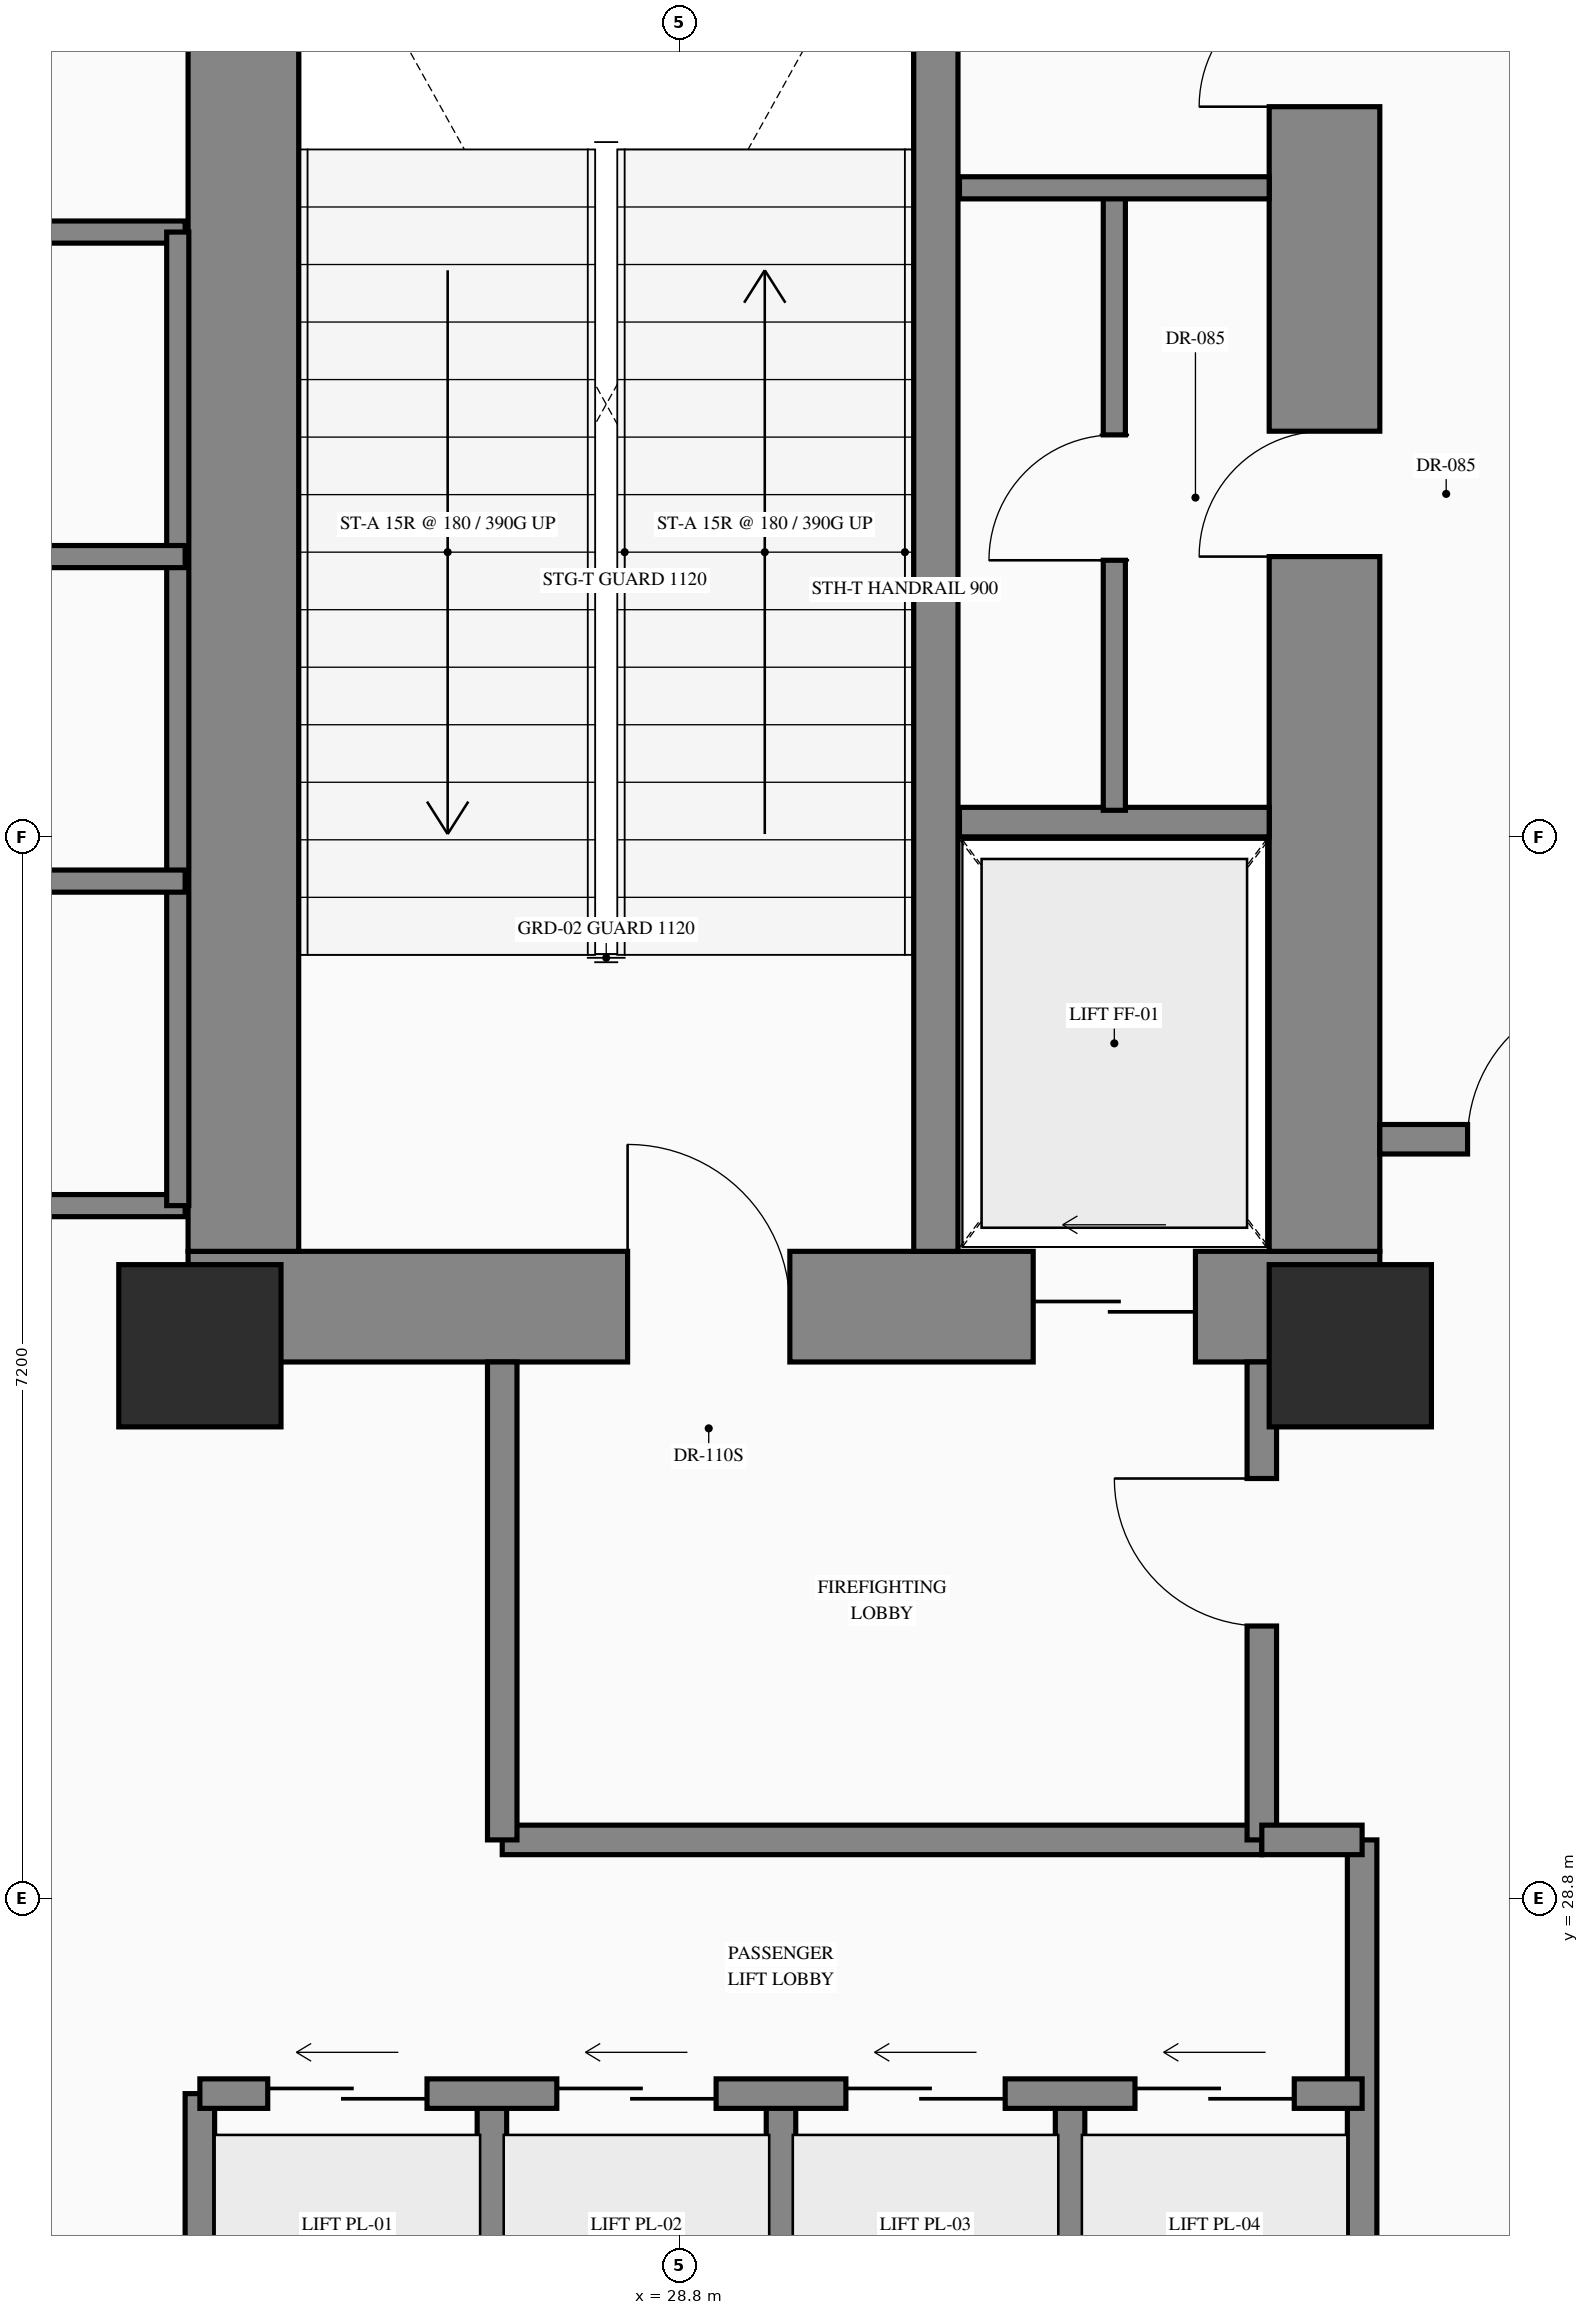
"""IFC4 building model, lengths in metres.
Left out: names, types, materials, properties, quantities, classifications, styles, units other than length and angle.
Written with IfcOpenShell. Run it as: python <this file> out.ifc"""

import sys

from ifc_helpers import new_model, si_unit, direction, frame, frame_2d, origin, origin_2d, place, context, subcontext, project, spatial, rectangle, extrude, element, fill, save


model = new_model("IFC4")
c1 = context("Model", 3, precision=1e-05, world=origin(), true_north=direction((0.0, 1.0)))
c2 = subcontext(c1, "Body", "Model", "MODEL_VIEW")
j1 = project(units=[si_unit("LENGTHUNIT", "METRE"), si_unit("PLANEANGLEUNIT", "RADIAN")], contexts=[c1])
p1 = place(None, origin())
s1 = spatial("IfcSite", under=j1, at=p1, CompositionType="ELEMENT")
p2 = place(p1, origin())
s2 = spatial("IfcBuilding", under=s1, at=p2, CompositionType="ELEMENT")
p3 = place(p2, origin())
s3 = spatial("IfcBuildingStorey", under=s2, at=p3, CompositionType="ELEMENT", Elevation=0.0)
p4 = place(p3, frame((25.47, 32.815, 0.0), z_axis=(0.0, 0.0, 1.0), x_axis=(1.0, 0.0, 0.0)))
e1 = element("IfcWall", 1, at=p4, inside=s3, PredefinedType="SHEAR", context=c2, shape_type="SweptSolid", body=[
    extrude(rectangle(XDim=8.08, YDim=0.75, at=frame_2d((4.04, 0.0))), origin(), (0.0, 0.0, 1.0), 5.4),
])
p5 = place(p4, frame((2.98, 0.0, 0.0)))
e2 = element("IfcOpeningElement", 2, at=p5, cuts=e1, PredefinedType="OPENING", context=c2, shape_type="SweptSolid", body=[
    extrude(rectangle(XDim=1.1, YDim=2.2, at=frame_2d((0.55, 1.1))), frame((0.0, 0.385, 0.0), z_axis=(0.0, -1.0, 0.0), x_axis=(1.0, 0.0, 0.0)), (0.0, 0.0, 1.0), 0.77),
])
p6 = place(p4, frame((5.73, 0.0, 0.0)))
e3 = element("IfcOpeningElement", 3, at=p6, cuts=e1, PredefinedType="OPENING", context=c2, shape_type="SweptSolid", body=[
    extrude(rectangle(XDim=1.1, YDim=2.15, at=frame_2d((0.55, 1.075))), frame((0.0, 0.385, 0.0), z_axis=(0.0, -1.0, 0.0), x_axis=(1.0, 0.0, 0.0)), (0.0, 0.0, 1.0), 0.77),
])
p7 = place(p3, frame((25.845, 33.19, 0.0), z_axis=(0.0, 0.0, 1.0), x_axis=(0.0, 1.0, 0.0)))
e4 = element("IfcWall", 4, at=p7, inside=s3, PredefinedType="SHEAR", context=c2, shape_type="SweptSolid", body=[
    extrude(rectangle(XDim=9.48, YDim=0.75, at=frame_2d((4.74, 0.0))), origin(), (0.0, 0.0, 1.0), 5.4),
])
p8 = place(p3, frame((33.175, 33.19, 0.0), z_axis=(0.0, 0.0, 1.0), x_axis=(0.0, 1.0, 0.0)))
e5 = element("IfcWall", 5, at=p8, inside=s3, PredefinedType="SHEAR", context=c2, shape_type="SweptSolid", body=[
    extrude(rectangle(XDim=9.48, YDim=0.75, at=frame_2d((4.74, 0.0))), origin(), (0.0, 0.0, 1.0), 5.4),
])
p9 = place(p8, frame((4.71, 0.0, 0.0)))
e6 = element("IfcOpeningElement", 6, at=p9, cuts=e5, PredefinedType="OPENING", context=c2, shape_type="SweptSolid", body=[
    extrude(rectangle(XDim=0.85, YDim=2.08, at=frame_2d((0.425, 1.04))), frame((0.0, 0.385, 0.0), z_axis=(0.0, -1.0, 0.0), x_axis=(1.0, 0.0, 0.0)), (0.0, 0.0, 1.0), 0.77),
])
p10 = place(p8, frame((7.76, 0.0, 0.0)))
e7 = element("IfcOpeningElement", 7, at=p10, cuts=e5, PredefinedType="OPENING", context=c2, shape_type="SweptSolid", body=[
    extrude(rectangle(XDim=0.85, YDim=2.08, at=frame_2d((0.425, 1.04))), frame((0.0, 0.385, 0.0), z_axis=(0.0, -1.0, 0.0), x_axis=(1.0, 0.0, 0.0)), (0.0, 0.0, 1.0), 0.77),
])
p11 = place(p3, frame((30.54, 33.19, 0.0), z_axis=(0.0, 0.0, 1.0), x_axis=(0.0, 1.0, 0.0)))
e8 = element("IfcWall", 8, at=p11, inside=s3, PredefinedType="SHEAR", context=c2, shape_type="SweptSolid", body=[
    extrude(rectangle(XDim=9.48, YDim=0.3, at=frame_2d((4.74, 0.0))), origin(), (0.0, 0.0, 1.0), 5.4),
])
for number, where, z_axis, x_axis in (
    (9, (25.55, 32.55, 0.0), (0.0, 0.0, 1.0), (1.0, 0.0, 0.0)),
    (10, (33.35, 32.55, 0.0), (0.0, 0.0, 1.0), (1.0, 0.0, 0.0)),
):
    element("IfcColumn", number, at=place(p3, frame(where, z_axis=z_axis, x_axis=x_axis)), inside=s3, PredefinedType="COLUMN", context=c2, shape_type="SweptSolid", body=[
        extrude(rectangle(XDim=1.1, YDim=1.1, at=origin_2d()), origin(), (0.0, 0.0, 1.0), 5.4),
    ])
p12 = place(p3, frame((30.7, 36.1, 0.0), z_axis=(0.0, 0.0, 1.0), x_axis=(1.0, 0.0, 0.0)))
e11 = element("IfcWall", 11, at=p12, inside=s3, PredefinedType="STANDARD", context=c2, shape_type="SweptSolid", body=[
    extrude(rectangle(XDim=2.1, YDim=0.2, at=frame_2d((1.05, 0.0))), origin(), (0.0, 0.0, 1.0), 5.1),
])
p13 = place(p3, frame((31.75, 36.18, 0.0), z_axis=(0.0, 0.0, 1.0), x_axis=(0.0, 1.0, 0.0)))
e12 = element("IfcWall", 12, at=p13, inside=s3, PredefinedType="PARTITIONING", context=c2, shape_type="SweptSolid", body=[
    extrude(rectangle(XDim=4.24, YDim=0.15, at=frame_2d((2.12, 0.0))), origin(), (0.0, 0.0, 1.0), 5.1),
])
p14 = place(p13, frame((1.695, 0.0, 0.0)))
e13 = element("IfcOpeningElement", 13, at=p14, cuts=e12, PredefinedType="OPENING", context=c2, shape_type="SweptSolid", body=[
    extrude(rectangle(XDim=0.85, YDim=2.08, at=frame_2d((0.425, 1.04))), frame((0.0, 0.085, 0.0), z_axis=(0.0, -1.0, 0.0), x_axis=(1.0, 0.0, 0.0)), (0.0, 0.0, 1.0), 0.17),
])
p15 = place(p3, frame((30.7, 40.4, 0.0), z_axis=(0.0, 0.0, 1.0), x_axis=(1.0, 0.0, 0.0)))
e14 = element("IfcWall", 14, at=p15, inside=s3, PredefinedType="PARTITIONING", context=c2, shape_type="SweptSolid", body=[
    extrude(rectangle(XDim=2.1, YDim=0.15, at=frame_2d((1.05, 0.0))), origin(), (0.0, 0.0, 1.0), 5.1),
])
p16 = place(p3, frame((27.6, 29.2, 0.0), z_axis=(0.0, 0.0, 1.0), x_axis=(1.0, 0.0, 0.0)))
e15 = element("IfcWall", 15, at=p16, inside=s3, PredefinedType="STANDARD", context=c2, shape_type="SweptSolid", body=[
    extrude(rectangle(XDim=5.15, YDim=0.2, at=frame_2d((2.575, 0.0))), origin(), (0.0, 0.0, 1.0), 5.1),
])
p17 = place(p3, frame((27.6, 29.2, 0.0), z_axis=(0.0, 0.0, 1.0), x_axis=(0.0, 1.0, 0.0)))
e16 = element("IfcWall", 16, at=p17, inside=s3, PredefinedType="STANDARD", context=c2, shape_type="SweptSolid", body=[
    extrude(rectangle(XDim=3.24, YDim=0.2, at=frame_2d((1.62, 0.0))), origin(), (0.0, 0.0, 1.0), 5.1),
])
p18 = place(p3, frame((32.75, 29.2, 0.0), z_axis=(0.0, 0.0, 1.0), x_axis=(0.0, 1.0, 0.0)))
e17 = element("IfcWall", 17, at=p18, inside=s3, PredefinedType="STANDARD", context=c2, shape_type="SweptSolid", body=[
    extrude(rectangle(XDim=3.24, YDim=0.2, at=frame_2d((1.62, 0.0))), origin(), (0.0, 0.0, 1.0), 5.1),
])
p19 = place(p18, frame((1.45, 0.0, 0.0)))
e18 = element("IfcOpeningElement", 18, at=p19, cuts=e17, PredefinedType="OPENING", context=c2, shape_type="SweptSolid", body=[
    extrude(rectangle(XDim=1.0, YDim=2.2, at=frame_2d((0.5, 1.1))), frame((0.0, 0.11, 0.0), z_axis=(0.0, -1.0, 0.0), x_axis=(1.0, 0.0, 0.0)), (0.0, 0.0, 1.0), 0.22),
])
p20 = place(p3, frame((25.55, 23.4, 0.0), z_axis=(0.0, 0.0, 1.0), x_axis=(0.0, 1.0, 0.0)))
e19 = element("IfcWall", 19, at=p20, inside=s3, PredefinedType="STANDARD", context=c2, shape_type="SweptSolid", body=[
    extrude(rectangle(XDim=4.08, YDim=0.2, at=frame_2d((2.04, 0.0))), origin(), (0.0, 0.0, 1.0), 3.895),
])
p21 = place(p3, frame((33.43, 23.4, 0.0), z_axis=(0.0, 0.0, 1.0), x_axis=(0.0, 1.0, 0.0)))
e20 = element("IfcWall", 20, at=p21, inside=s3, PredefinedType="STANDARD", context=c2, shape_type="SweptSolid", body=[
    extrude(rectangle(XDim=5.8, YDim=0.2, at=frame_2d((2.9, 0.0))), origin(), (0.0, 0.0, 1.0), 3.895),
])
for number, where, z_axis, x_axis in (
    (21, (27.53, 25.32, 0.0), (0.0, 0.0, 1.0), (0.0, 1.0, 0.0)),
    (22, (29.49, 25.32, 0.0), (0.0, 0.0, 1.0), (0.0, 1.0, 0.0)),
    (23, (31.45, 25.32, 0.0), (0.0, 0.0, 1.0), (0.0, 1.0, 0.0)),
):
    element("IfcWall", number, at=place(p3, frame(where, z_axis=z_axis, x_axis=x_axis)), inside=s3, PredefinedType="STANDARD", context=c2, shape_type="SweptSolid", body=[
        extrude(rectangle(XDim=2.16, YDim=0.2, at=frame_2d((1.08, 0.0))), origin(), (0.0, 0.0, 1.0), 5.1),
    ])
p22 = place(p3, frame((25.55, 27.48, 0.0), z_axis=(0.0, 0.0, 1.0), x_axis=(1.0, 0.0, 0.0)))
e24 = element("IfcWall", 24, at=p22, inside=s3, PredefinedType="STANDARD", context=c2, shape_type="SweptSolid", body=[
    extrude(rectangle(XDim=7.88, YDim=0.2, at=frame_2d((3.94, 0.0))), origin(), (0.0, 0.0, 1.0), 5.1),
])
p23 = place(p22, frame((0.46, 0.0, 0.0)))
e25 = element("IfcOpeningElement", 25, at=p23, cuts=e24, PredefinedType="OPENING", context=c2, shape_type="SweptSolid", body=[
    extrude(rectangle(XDim=1.08, YDim=2.15, at=frame_2d((0.54, 1.075))), frame((0.0, 0.11, 0.0), z_axis=(0.0, -1.0, 0.0), x_axis=(1.0, 0.0, 0.0)), (0.0, 0.0, 1.0), 0.22),
])
p24 = place(p22, frame((2.42, 0.0, 0.0)))
e26 = element("IfcOpeningElement", 26, at=p24, cuts=e24, PredefinedType="OPENING", context=c2, shape_type="SweptSolid", body=[
    extrude(rectangle(XDim=1.08, YDim=2.15, at=frame_2d((0.54, 1.075))), frame((0.0, 0.11, 0.0), z_axis=(0.0, -1.0, 0.0), x_axis=(1.0, 0.0, 0.0)), (0.0, 0.0, 1.0), 0.22),
])
p25 = place(p22, frame((4.38, 0.0, 0.0)))
e27 = element("IfcOpeningElement", 27, at=p25, cuts=e24, PredefinedType="OPENING", context=c2, shape_type="SweptSolid", body=[
    extrude(rectangle(XDim=1.08, YDim=2.15, at=frame_2d((0.54, 1.075))), frame((0.0, 0.11, 0.0), z_axis=(0.0, -1.0, 0.0), x_axis=(1.0, 0.0, 0.0)), (0.0, 0.0, 1.0), 0.22),
])
p26 = place(p22, frame((6.34, 0.0, 0.0)))
e28 = element("IfcOpeningElement", 28, at=p26, cuts=e24, PredefinedType="OPENING", context=c2, shape_type="SweptSolid", body=[
    extrude(rectangle(XDim=1.08, YDim=2.15, at=frame_2d((0.54, 1.075))), frame((0.0, 0.11, 0.0), z_axis=(0.0, -1.0, 0.0), x_axis=(1.0, 0.0, 0.0)), (0.0, 0.0, 1.0), 0.22),
])
for number, where, z_axis, x_axis in (
    (29, (22.15, 33.5, 0.0), (0.0, 0.0, 1.0), (1.0, 0.0, 0.0)),
    (30, (22.15, 40.1, 0.0), (0.0, 0.0, 1.0), (1.0, 0.0, 0.0)),
):
    element("IfcWall", number, at=place(p3, frame(where, z_axis=z_axis, x_axis=x_axis)), inside=s3, PredefinedType="PARTITIONING", context=c2, shape_type="SweptSolid", body=[
        extrude(rectangle(XDim=3.3, YDim=0.15, at=frame_2d((1.65, 0.0))), origin(), (0.0, 0.0, 1.0), 5.1),
    ])
p27 = place(p3, frame((25.4, 33.5, 0.0), z_axis=(0.0, 0.0, 1.0), x_axis=(0.0, 1.0, 0.0)))
e31 = element("IfcWall", 31, at=p27, inside=s3, PredefinedType="PARTITIONING", context=c2, shape_type="SweptSolid", body=[
    extrude(rectangle(XDim=6.6, YDim=0.15, at=frame_2d((3.3, 0.0))), origin(), (0.0, 0.0, 1.0), 5.1),
])
for number, where, z_axis, x_axis in (
    (32, (22.15, 35.7, 0.0), (0.0, 0.0, 1.0), (1.0, 0.0, 0.0)),
    (33, (22.15, 37.9, 0.0), (0.0, 0.0, 1.0), (1.0, 0.0, 0.0)),
):
    element("IfcWall", number, at=place(p3, frame(where, z_axis=z_axis, x_axis=x_axis)), inside=s3, PredefinedType="PARTITIONING", context=c2, shape_type="SweptSolid", body=[
        extrude(rectangle(XDim=3.3, YDim=0.15, at=frame_2d((1.65, 0.0))), origin(), (0.0, 0.0, 1.0), 5.1),
    ])
p28 = place(p3, frame((33.55, 33.95, 0.0), z_axis=(0.0, 0.0, 1.0), x_axis=(1.0, 0.0, 0.0)))
e34 = element("IfcWall", 34, at=p28, inside=s3, PredefinedType="STANDARD", context=c2, shape_type="SweptSolid", body=[
    extrude(rectangle(XDim=2.19, YDim=0.2, at=frame_2d((1.095, 0.0))), origin(), (0.0, 0.0, 1.0), 5.1),
])
p29 = place(p28, frame((0.595, 0.0, 0.0)))
e35 = element("IfcOpeningElement", 35, at=p29, cuts=e34, PredefinedType="OPENING", context=c2, shape_type="SweptSolid", body=[
    extrude(rectangle(XDim=1.0, YDim=2.2, at=frame_2d((0.5, 1.1))), frame((0.0, 0.11, 0.0), z_axis=(0.0, -1.0, 0.0), x_axis=(1.0, 0.0, 0.0)), (0.0, 0.0, 1.0), 0.22),
])
p30 = place(p3, frame((32.75, 29.2, 0.0), z_axis=(0.0, 0.0, 1.0), x_axis=(1.0, 0.0, 0.0)))
e36 = element("IfcWall", 36, at=p30, inside=s3, PredefinedType="STANDARD", context=c2, shape_type="SweptSolid", body=[
    extrude(rectangle(XDim=0.68, YDim=0.2, at=frame_2d((0.34, 0.0))), origin(), (0.0, 0.0, 1.0), 5.1),
])
p31 = place(p5, origin())
e37 = element("IfcDoor", 37, at=p31, inside=s3, OperationType="SINGLE_SWING_LEFT", PredefinedType="DOOR", context=c2, shape_type="SweptSolid", body=[
    extrude(rectangle(XDim=1.1, YDim=2.2, at=frame_2d((0.55, 1.1))), frame((0.0, 0.025, 0.0), z_axis=(0.0, -1.0, 0.0), x_axis=(1.0, 0.0, 0.0)), (0.0, 0.0, 1.0), 0.05),
])
fill(e2, e37)
p32 = place(p6, origin())
e38 = element("IfcDoor", 38, at=p32, inside=s3, OperationType="SLIDING_TO_LEFT", PredefinedType="USERDEFINED", context=c2, shape_type="SweptSolid", body=[
    extrude(rectangle(XDim=1.1, YDim=2.15, at=frame_2d((0.55, 1.075))), frame((0.0, 0.025, 0.0), z_axis=(0.0, -1.0, 0.0), x_axis=(1.0, 0.0, 0.0)), (0.0, 0.0, 1.0), 0.05),
])
fill(e3, e38)
p33 = place(p9, origin())
e39 = element("IfcDoor", 39, at=p33, inside=s3, OperationType="SINGLE_SWING_LEFT", PredefinedType="DOOR", context=c2, shape_type="SweptSolid", body=[
    extrude(rectangle(XDim=0.85, YDim=2.08, at=frame_2d((0.425, 1.04))), frame((0.0, 0.025, 0.0), z_axis=(0.0, -1.0, 0.0), x_axis=(1.0, 0.0, 0.0)), (0.0, 0.0, 1.0), 0.05),
])
fill(e6, e39)
p34 = place(p10, origin())
e40 = element("IfcDoor", 40, at=p34, inside=s3, OperationType="SINGLE_SWING_LEFT", PredefinedType="DOOR", context=c2, shape_type="SweptSolid", body=[
    extrude(rectangle(XDim=0.85, YDim=2.08, at=frame_2d((0.425, 1.04))), frame((0.0, 0.025, 0.0), z_axis=(0.0, -1.0, 0.0), x_axis=(1.0, 0.0, 0.0)), (0.0, 0.0, 1.0), 0.05),
])
fill(e7, e40)
p35 = place(p14, origin())
e41 = element("IfcDoor", 41, at=p35, inside=s3, OperationType="SINGLE_SWING_LEFT", PredefinedType="DOOR", context=c2, shape_type="SweptSolid", body=[
    extrude(rectangle(XDim=0.85, YDim=2.08, at=frame_2d((0.425, 1.04))), frame((0.0, 0.025, 0.0), z_axis=(0.0, -1.0, 0.0), x_axis=(1.0, 0.0, 0.0)), (0.0, 0.0, 1.0), 0.05),
])
fill(e13, e41)
p36 = place(p19, origin())
e42 = element("IfcDoor", 42, at=p36, inside=s3, OperationType="SINGLE_SWING_RIGHT", PredefinedType="DOOR", context=c2, shape_type="SweptSolid", body=[
    extrude(rectangle(XDim=1.0, YDim=2.2, at=frame_2d((0.5, 1.1))), frame((0.0, 0.025, 0.0), z_axis=(0.0, -1.0, 0.0), x_axis=(1.0, 0.0, 0.0)), (0.0, 0.0, 1.0), 0.05),
])
fill(e18, e42)
p37 = place(p23, origin())
e43 = element("IfcDoor", 43, at=p37, inside=s3, OperationType="SLIDING_TO_LEFT", PredefinedType="USERDEFINED", context=c2, shape_type="SweptSolid", body=[
    extrude(rectangle(XDim=1.08, YDim=2.15, at=frame_2d((0.54, 1.075))), frame((0.0, 0.025, 0.0), z_axis=(0.0, -1.0, 0.0), x_axis=(1.0, 0.0, 0.0)), (0.0, 0.0, 1.0), 0.05),
])
fill(e25, e43)
p38 = place(p24, origin())
e44 = element("IfcDoor", 44, at=p38, inside=s3, OperationType="SLIDING_TO_LEFT", PredefinedType="USERDEFINED", context=c2, shape_type="SweptSolid", body=[
    extrude(rectangle(XDim=1.08, YDim=2.15, at=frame_2d((0.54, 1.075))), frame((0.0, 0.025, 0.0), z_axis=(0.0, -1.0, 0.0), x_axis=(1.0, 0.0, 0.0)), (0.0, 0.0, 1.0), 0.05),
])
fill(e26, e44)
p39 = place(p25, origin())
e45 = element("IfcDoor", 45, at=p39, inside=s3, OperationType="SLIDING_TO_LEFT", PredefinedType="USERDEFINED", context=c2, shape_type="SweptSolid", body=[
    extrude(rectangle(XDim=1.08, YDim=2.15, at=frame_2d((0.54, 1.075))), frame((0.0, 0.025, 0.0), z_axis=(0.0, -1.0, 0.0), x_axis=(1.0, 0.0, 0.0)), (0.0, 0.0, 1.0), 0.05),
])
fill(e27, e45)
p40 = place(p26, origin())
e46 = element("IfcDoor", 46, at=p40, inside=s3, OperationType="SLIDING_TO_LEFT", PredefinedType="USERDEFINED", context=c2, shape_type="SweptSolid", body=[
    extrude(rectangle(XDim=1.08, YDim=2.15, at=frame_2d((0.54, 1.075))), frame((0.0, 0.025, 0.0), z_axis=(0.0, -1.0, 0.0), x_axis=(1.0, 0.0, 0.0)), (0.0, 0.0, 1.0), 0.05),
])
fill(e28, e46)
p41 = place(p29, origin())
e47 = element("IfcDoor", 47, at=p41, inside=s3, OperationType="SINGLE_SWING_RIGHT", PredefinedType="DOOR", context=c2, shape_type="SweptSolid", body=[
    extrude(rectangle(XDim=1.0, YDim=2.2, at=frame_2d((0.5, 1.1))), frame((0.0, 0.025, 0.0), z_axis=(0.0, -1.0, 0.0), x_axis=(1.0, 0.0, 0.0)), (0.0, 0.0, 1.0), 0.05),
])
fill(e35, e47)
save(model, sys.argv[1])
